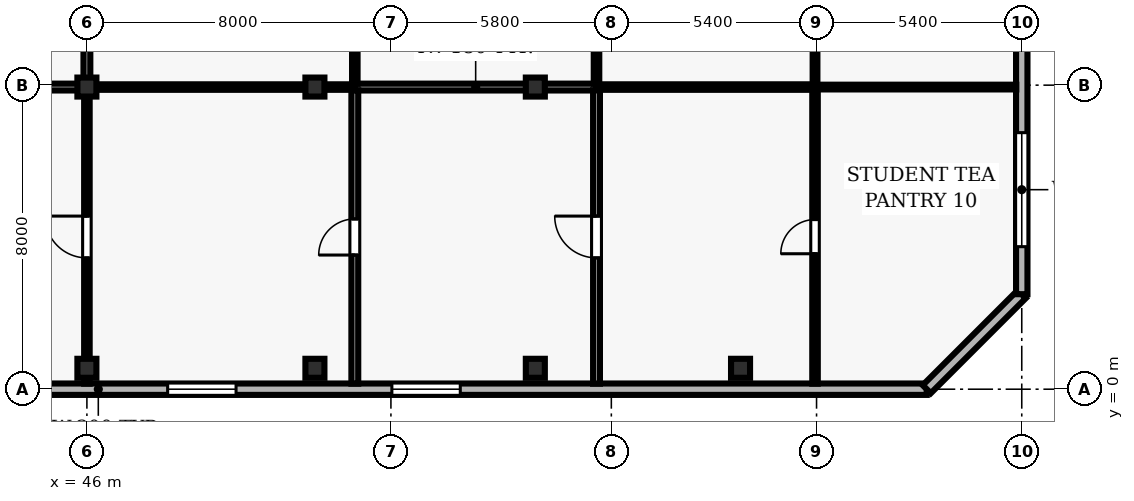
"""IFC4 building model, lengths in metres.
Left out: names, types, materials, properties, quantities, classifications, styles, units other than length and angle.
Written with IfcOpenShell. Run it as: python <this file> out.ifc"""

import sys

from ifc_helpers import new_model, si_unit, direction, frame, frame_2d, origin, origin_2d, place, context, subcontext, project, spatial, rectangle, hollow_rectangle, extrude, element, fill, save


model = new_model("IFC4")
c1 = context("Model", 3, precision=1e-05, world=origin(), true_north=direction((0.0, 1.0)))
c2 = subcontext(c1, "Body", "Model", "MODEL_VIEW")
j1 = project(units=[si_unit("LENGTHUNIT", "METRE"), si_unit("PLANEANGLEUNIT", "RADIAN")], contexts=[c1])
p1 = place(None, origin())
s1 = spatial("IfcSite", under=j1, at=p1, CompositionType="ELEMENT")
p2 = place(p1, origin())
s2 = spatial("IfcBuilding", under=s1, at=p2, CompositionType="ELEMENT")
p3 = place(p2, frame((0.0, 0.0, 138.5)))
s3 = spatial("IfcBuildingStorey", under=s2, at=p3, CompositionType="ELEMENT", Elevation=138.5)
for number, where, z_axis, x_axis in (
    (1, (46.0, 0.55, 0.0), (0.0, 0.0, 1.0), (1.0, 0.0, 0.0)),
    (2, (46.0, 7.95, 0.0), (0.0, 0.0, 1.0), (1.0, 0.0, 0.0)),
    (3, (52.0, 0.55, 0.0), (0.0, 0.0, 1.0), (1.0, 0.0, 0.0)),
    (4, (52.0, 7.95, 0.0), (0.0, 0.0, 1.0), (1.0, 0.0, 0.0)),
    (5, (57.8, 0.55, 0.0), (0.0, 0.0, 1.0), (1.0, 0.0, 0.0)),
    (6, (57.8, 7.95, 0.0), (0.0, 0.0, 1.0), (1.0, 0.0, 0.0)),
    (7, (63.2, 0.55, 0.0), (0.0, 0.0, 1.0), (1.0, 0.0, 0.0)),
):
    element("IfcColumn", number, at=place(p3, frame(where, z_axis=z_axis, x_axis=x_axis)), inside=s3, PredefinedType="COLUMN", context=c2, shape_type="SweptSolid", body=[
        extrude(hollow_rectangle(XDim=0.5, YDim=0.5, WallThickness=0.025, at=origin_2d()), origin(), (0.0, 0.0, 1.0), 3.9),
    ])
p4 = place(p3, frame((24.5, 0.0, 0.0), z_axis=(0.0, 0.0, 1.0), x_axis=(1.0, 0.0, 0.0)))
e8 = element("IfcWall", 8, at=p4, inside=s3, PredefinedType="SOLIDWALL", context=c2, shape_type="SweptSolid", body=[
    extrude(rectangle(XDim=43.6, YDim=0.3, at=frame_2d((21.8, 0.0))), origin(), (0.0, 0.0, 1.0), 3.69),
])
p5 = place(p4, frame((1.825, 0.0, 0.9)))
e9 = element("IfcOpeningElement", 9, at=p5, cuts=e8, PredefinedType="OPENING", context=c2, shape_type="SweptSolid", body=[
    extrude(rectangle(XDim=1.8, YDim=2.2, at=frame_2d((0.9, 1.1))), frame((0.0, 0.16, 0.0), z_axis=(0.0, -1.0, 0.0), x_axis=(1.0, 0.0, 0.0)), (0.0, 0.0, 1.0), 0.32),
])
p6 = place(p4, frame((8.175, 0.0, 0.9)))
e10 = element("IfcOpeningElement", 10, at=p6, cuts=e8, PredefinedType="OPENING", context=c2, shape_type="SweptSolid", body=[
    extrude(rectangle(XDim=1.8, YDim=2.2, at=frame_2d((0.9, 1.1))), frame((0.0, 0.16, 0.0), z_axis=(0.0, -1.0, 0.0), x_axis=(1.0, 0.0, 0.0)), (0.0, 0.0, 1.0), 0.32),
])
p7 = place(p4, frame((18.175, 0.0, 0.9)))
e11 = element("IfcOpeningElement", 11, at=p7, cuts=e8, PredefinedType="OPENING", context=c2, shape_type="SweptSolid", body=[
    extrude(rectangle(XDim=1.8, YDim=2.2, at=frame_2d((0.9, 1.1))), frame((0.0, 0.16, 0.0), z_axis=(0.0, -1.0, 0.0), x_axis=(1.0, 0.0, 0.0)), (0.0, 0.0, 1.0), 0.32),
])
p8 = place(p4, frame((23.625, 0.0, 0.9)))
e12 = element("IfcOpeningElement", 12, at=p8, cuts=e8, PredefinedType="OPENING", context=c2, shape_type="SweptSolid", body=[
    extrude(rectangle(XDim=1.8, YDim=2.2, at=frame_2d((0.9, 1.1))), frame((0.0, 0.16, 0.0), z_axis=(0.0, -1.0, 0.0), x_axis=(1.0, 0.0, 0.0)), (0.0, 0.0, 1.0), 0.32),
])
p9 = place(p4, frame((29.525, 0.0, 0.9)))
e13 = element("IfcOpeningElement", 13, at=p9, cuts=e8, PredefinedType="OPENING", context=c2, shape_type="SweptSolid", body=[
    extrude(rectangle(XDim=1.8, YDim=2.2, at=frame_2d((0.9, 1.1))), frame((0.0, 0.16, 0.0), z_axis=(0.0, -1.0, 0.0), x_axis=(1.0, 0.0, 0.0)), (0.0, 0.0, 1.0), 0.32),
])
p10 = place(p3, frame((68.1, 0.0, 0.0), z_axis=(0.0, 0.0, 1.0), x_axis=(0.707106781187, 0.707106781187, 0.0)))
e14 = element("IfcWall", 14, at=p10, inside=s3, PredefinedType="SOLIDWALL", context=c2, shape_type="SweptSolid", body=[
    extrude(rectangle(XDim=3.536, YDim=0.3, at=frame_2d((1.768, 0.0))), origin(), (0.0, 0.0, 1.0), 3.69),
])
p11 = place(p3, frame((70.6, 2.5, 0.0), z_axis=(0.0, 0.0, 1.0), x_axis=(0.0, 1.0, 0.0)))
e15 = element("IfcWall", 15, at=p11, inside=s3, PredefinedType="SOLIDWALL", context=c2, shape_type="SweptSolid", body=[
    extrude(rectangle(XDim=11.0, YDim=0.3, at=frame_2d((5.5, 0.0))), origin(), (0.0, 0.0, 1.0), 3.69),
])
p12 = place(p11, frame((1.25, 0.0, 0.9)))
e16 = element("IfcOpeningElement", 16, at=p12, cuts=e15, PredefinedType="OPENING", context=c2, shape_type="SweptSolid", body=[
    extrude(rectangle(XDim=3.0, YDim=2.2, at=frame_2d((1.5, 1.1))), frame((0.0, 0.16, 0.0), z_axis=(0.0, -1.0, 0.0), x_axis=(1.0, 0.0, 0.0)), (0.0, 0.0, 1.0), 0.32),
])
p13 = place(p11, frame((6.75, 0.0, 0.9)))
e17 = element("IfcOpeningElement", 17, at=p13, cuts=e15, PredefinedType="OPENING", context=c2, shape_type="SweptSolid", body=[
    extrude(rectangle(XDim=3.0, YDim=2.2, at=frame_2d((1.5, 1.1))), frame((0.0, 0.16, 0.0), z_axis=(0.0, -1.0, 0.0), x_axis=(1.0, 0.0, 0.0)), (0.0, 0.0, 1.0), 0.32),
])
p14 = place(p3, frame((46.0, 7.95, 0.0), z_axis=(0.0, 0.0, 1.0), x_axis=(-1.0, 0.0, 0.0)))
e18 = element("IfcWall", 18, at=p14, inside=s3, PredefinedType="PARTITIONING", context=c2, shape_type="SweptSolid", body=[
    extrude(rectangle(XDim=5.65, YDim=0.18, at=frame_2d((2.825, 0.0))), origin(), (0.0, 0.0, 1.0), 3.073),
])
p15 = place(p14, frame((2.275, 0.0, 0.0)))
e19 = element("IfcOpeningElement", 19, at=p15, cuts=e18, PredefinedType="OPENING", context=c2, shape_type="SweptSolid", body=[
    extrude(rectangle(XDim=1.1, YDim=2.15, at=frame_2d((0.55, 1.075))), frame((0.0, 0.1, 0.0), z_axis=(0.0, -1.0, 0.0), x_axis=(1.0, 0.0, 0.0)), (0.0, 0.0, 1.0), 0.2),
])
p16 = place(p3, frame((53.05, 7.95, 0.0), z_axis=(0.0, 0.0, 1.0), x_axis=(-1.0, 0.0, 0.0)))
e20 = element("IfcWall", 20, at=p16, inside=s3, PredefinedType="PARTITIONING", context=c2, shape_type="SweptSolid", body=[
    extrude(rectangle(XDim=7.05, YDim=0.145, at=frame_2d((3.525, 0.0))), origin(), (0.0, 0.0, 1.0), 3.073),
])
p17 = place(p3, frame((59.41, 7.95, 0.0), z_axis=(0.0, 0.0, 1.0), x_axis=(-1.0, 0.0, 0.0)))
e21 = element("IfcWall", 21, at=p17, inside=s3, PredefinedType="PARTITIONING", context=c2, shape_type="SweptSolid", body=[
    extrude(rectangle(XDim=6.36, YDim=0.18, at=frame_2d((3.18, 0.0))), origin(), (0.0, 0.0, 1.0), 3.073),
])
p18 = place(p3, frame((65.16, 7.95, 0.0), z_axis=(0.0, 0.0, 1.0), x_axis=(-1.0, 0.0, 0.0)))
e22 = element("IfcWall", 22, at=p18, inside=s3, PredefinedType="PARTITIONING", context=c2, shape_type="SweptSolid", body=[
    extrude(rectangle(XDim=5.75, YDim=0.145, at=frame_2d((2.875, 0.0))), origin(), (0.0, 0.0, 1.0), 3.69),
])
p19 = place(p3, frame((70.455, 7.95, 0.0), z_axis=(0.0, 0.0, 1.0), x_axis=(-1.0, 0.0, 0.0)))
e23 = element("IfcWall", 23, at=p19, inside=s3, PredefinedType="PARTITIONING", context=c2, shape_type="SweptSolid", body=[
    extrude(rectangle(XDim=5.295, YDim=0.125, at=frame_2d((2.647, 0.0))), origin(), (0.0, 0.0, 1.0), 3.69),
])
p20 = place(p3, frame((46.0, 0.145, 0.0), z_axis=(0.0, 0.0, 1.0), x_axis=(0.0, 1.0, 0.0)))
e24 = element("IfcWall", 24, at=p20, inside=s3, PredefinedType="PARTITIONING", context=c2, shape_type="SweptSolid", body=[
    extrude(rectangle(XDim=7.72, YDim=0.145, at=frame_2d((3.86, 0.0))), origin(), (0.0, 0.0, 1.0), 3.073),
])
p21 = place(p20, frame((3.31, 0.0, 0.0)))
e25 = element("IfcOpeningElement", 25, at=p21, cuts=e24, PredefinedType="OPENING", context=c2, shape_type="SweptSolid", body=[
    extrude(rectangle(XDim=1.1, YDim=2.15, at=frame_2d((0.55, 1.075))), frame((0.0, 0.083, 0.0), z_axis=(0.0, -1.0, 0.0), x_axis=(1.0, 0.0, 0.0)), (0.0, 0.0, 1.0), 0.165),
])
p22 = place(p3, frame((46.0, 8.035, 0.0), z_axis=(0.0, 0.0, 1.0), x_axis=(0.0, 1.0, 0.0)))
e26 = element("IfcWall", 26, at=p22, inside=s3, PredefinedType="PARTITIONING", context=c2, shape_type="SweptSolid", body=[
    extrude(rectangle(XDim=5.53, YDim=0.18, at=frame_2d((2.765, 0.0))), origin(), (0.0, 0.0, 1.0), 3.073),
])
p23 = place(p3, frame((53.05, 0.145, 0.0), z_axis=(0.0, 0.0, 1.0), x_axis=(0.0, 1.0, 0.0)))
e27 = element("IfcWall", 27, at=p23, inside=s3, PredefinedType="PARTITIONING", context=c2, shape_type="SweptSolid", body=[
    extrude(rectangle(XDim=7.72, YDim=0.18, at=frame_2d((3.86, 0.0))), origin(), (0.0, 0.0, 1.0), 3.69),
])
p24 = place(p23, frame((3.385, 0.0, 0.0)))
e28 = element("IfcOpeningElement", 28, at=p24, cuts=e27, PredefinedType="OPENING", context=c2, shape_type="SweptSolid", body=[
    extrude(rectangle(XDim=0.95, YDim=2.1, at=frame_2d((0.475, 1.05))), frame((0.0, 0.1, 0.0), z_axis=(0.0, -1.0, 0.0), x_axis=(1.0, 0.0, 0.0)), (0.0, 0.0, 1.0), 0.2),
])
p25 = place(p3, frame((53.05, 8.035, 0.0), z_axis=(0.0, 0.0, 1.0), x_axis=(0.0, 1.0, 0.0)))
e29 = element("IfcWall", 29, at=p25, inside=s3, PredefinedType="PARTITIONING", context=c2, shape_type="SweptSolid", body=[
    extrude(rectangle(XDim=5.547, YDim=0.145, at=frame_2d((2.773, 0.0))), origin(), (0.0, 0.0, 1.0), 3.69),
])
p26 = place(p3, frame((59.41, 0.145, 0.0), z_axis=(0.0, 0.0, 1.0), x_axis=(0.0, 1.0, 0.0)))
e30 = element("IfcWall", 30, at=p26, inside=s3, PredefinedType="PARTITIONING", context=c2, shape_type="SweptSolid", body=[
    extrude(rectangle(XDim=7.72, YDim=0.18, at=frame_2d((3.86, 0.0))), origin(), (0.0, 0.0, 1.0), 3.69),
])
p27 = place(p26, frame((3.31, 0.0, 0.0)))
e31 = element("IfcOpeningElement", 31, at=p27, cuts=e30, PredefinedType="OPENING", context=c2, shape_type="SweptSolid", body=[
    extrude(rectangle(XDim=1.1, YDim=2.15, at=frame_2d((0.55, 1.075))), frame((0.0, 0.1, 0.0), z_axis=(0.0, -1.0, 0.0), x_axis=(1.0, 0.0, 0.0)), (0.0, 0.0, 1.0), 0.2),
])
p28 = place(p3, frame((59.41, 8.035, 0.0), z_axis=(0.0, 0.0, 1.0), x_axis=(0.0, 1.0, 0.0)))
e32 = element("IfcWall", 32, at=p28, inside=s3, PredefinedType="PARTITIONING", context=c2, shape_type="SweptSolid", body=[
    extrude(rectangle(XDim=5.54, YDim=0.145, at=frame_2d((2.77, 0.0))), origin(), (0.0, 0.0, 1.0), 3.69),
])
p29 = place(p3, frame((65.16, 0.145, 0.0), z_axis=(0.0, 0.0, 1.0), x_axis=(0.0, 1.0, 0.0)))
e33 = element("IfcWall", 33, at=p29, inside=s3, PredefinedType="PARTITIONING", context=c2, shape_type="SweptSolid", body=[
    extrude(rectangle(XDim=7.738, YDim=0.145, at=frame_2d((3.869, 0.0))), origin(), (0.0, 0.0, 1.0), 3.69),
])
p30 = place(p29, frame((3.419, 0.0, 0.0)))
e34 = element("IfcOpeningElement", 34, at=p30, cuts=e33, PredefinedType="OPENING", context=c2, shape_type="SweptSolid", body=[
    extrude(rectangle(XDim=0.9, YDim=2.1, at=frame_2d((0.45, 1.05))), frame((0.0, 0.083, 0.0), z_axis=(0.0, -1.0, 0.0), x_axis=(1.0, 0.0, 0.0)), (0.0, 0.0, 1.0), 0.165),
])
p31 = place(p3, frame((65.16, 8.018, 0.0), z_axis=(0.0, 0.0, 1.0), x_axis=(0.0, 1.0, 0.0)))
e35 = element("IfcWall", 35, at=p31, inside=s3, PredefinedType="PARTITIONING", context=c2, shape_type="SweptSolid", body=[
    extrude(rectangle(XDim=5.557, YDim=0.125, at=frame_2d((2.778, 0.0))), origin(), (0.0, 0.0, 1.0), 3.69),
])
p32 = place(p8, origin())
e36 = element("IfcWindow", 36, at=p32, inside=s3, PartitioningType="SINGLE_PANEL", PredefinedType="WINDOW", context=c2, shape_type="SweptSolid", body=[
    extrude(rectangle(XDim=1.8, YDim=2.2, at=frame_2d((0.9, 1.1))), frame((0.0, 0.03, 0.0), z_axis=(0.0, -1.0, 0.0), x_axis=(1.0, 0.0, 0.0)), (0.0, 0.0, 1.0), 0.06),
])
fill(e12, e36)
p33 = place(p9, origin())
e37 = element("IfcWindow", 37, at=p33, inside=s3, PartitioningType="SINGLE_PANEL", PredefinedType="WINDOW", context=c2, shape_type="SweptSolid", body=[
    extrude(rectangle(XDim=1.8, YDim=2.2, at=frame_2d((0.9, 1.1))), frame((0.0, 0.03, 0.0), z_axis=(0.0, -1.0, 0.0), x_axis=(1.0, 0.0, 0.0)), (0.0, 0.0, 1.0), 0.06),
])
fill(e13, e37)
p34 = place(p12, origin())
e38 = element("IfcWindow", 38, at=p34, inside=s3, PartitioningType="SINGLE_PANEL", PredefinedType="WINDOW", context=c2, shape_type="SweptSolid", body=[
    extrude(rectangle(XDim=3.0, YDim=2.2, at=frame_2d((1.5, 1.1))), frame((0.0, 0.03, 0.0), z_axis=(0.0, -1.0, 0.0), x_axis=(1.0, 0.0, 0.0)), (0.0, 0.0, 1.0), 0.06),
])
fill(e16, e38)
p35 = place(p21, origin())
e39 = element("IfcDoor", 39, at=p35, inside=s3, OperationType="SINGLE_SWING_RIGHT", PredefinedType="DOOR", context=c2, shape_type="SweptSolid", body=[
    extrude(rectangle(XDim=1.1, YDim=2.15, at=frame_2d((0.55, 1.075))), frame((0.0, 0.025, 0.0), z_axis=(0.0, -1.0, 0.0), x_axis=(1.0, 0.0, 0.0)), (0.0, 0.0, 1.0), 0.05),
])
fill(e25, e39)
p36 = place(p24, origin())
e40 = element("IfcDoor", 40, at=p36, inside=s3, OperationType="SINGLE_SWING_LEFT", PredefinedType="DOOR", context=c2, shape_type="SweptSolid", body=[
    extrude(rectangle(XDim=0.95, YDim=2.1, at=frame_2d((0.475, 1.05))), frame((0.0, 0.025, 0.0), z_axis=(0.0, -1.0, 0.0), x_axis=(1.0, 0.0, 0.0)), (0.0, 0.0, 1.0), 0.05),
])
fill(e28, e40)
p37 = place(p27, origin())
e41 = element("IfcDoor", 41, at=p37, inside=s3, OperationType="SINGLE_SWING_RIGHT", PredefinedType="DOOR", context=c2, shape_type="SweptSolid", body=[
    extrude(rectangle(XDim=1.1, YDim=2.15, at=frame_2d((0.55, 1.075))), frame((0.0, 0.025, 0.0), z_axis=(0.0, -1.0, 0.0), x_axis=(1.0, 0.0, 0.0)), (0.0, 0.0, 1.0), 0.05),
])
fill(e31, e41)
p38 = place(p30, origin())
e42 = element("IfcDoor", 42, at=p38, inside=s3, OperationType="SINGLE_SWING_LEFT", PredefinedType="DOOR", context=c2, shape_type="SweptSolid", body=[
    extrude(rectangle(XDim=0.9, YDim=2.1, at=frame_2d((0.45, 1.05))), frame((0.0, 0.025, 0.0), z_axis=(0.0, -1.0, 0.0), x_axis=(1.0, 0.0, 0.0)), (0.0, 0.0, 1.0), 0.05),
])
fill(e34, e42)
save(model, sys.argv[1])
